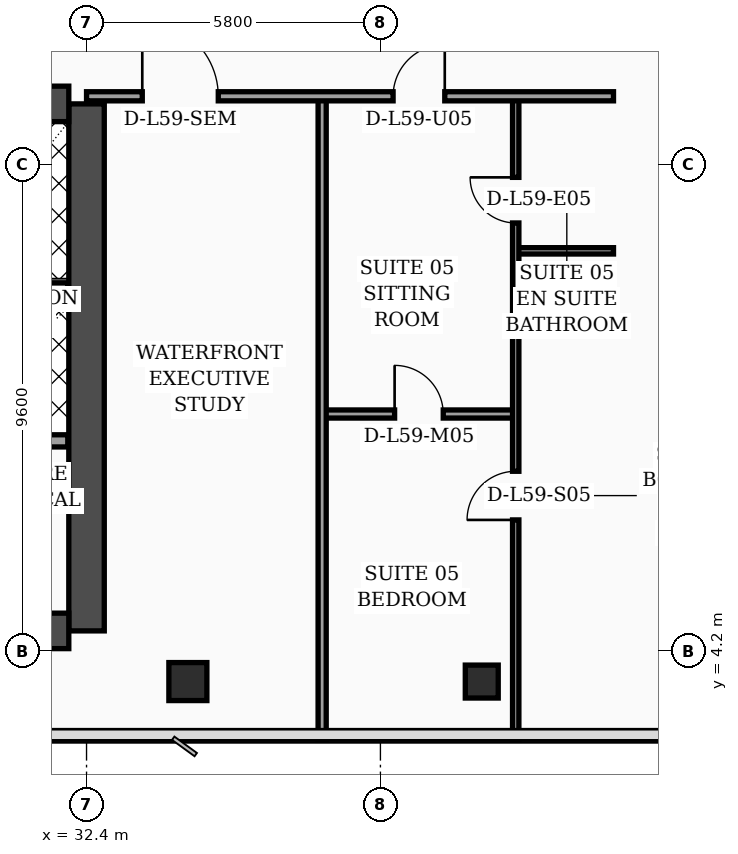
"""IFC4 building model, lengths in metres.
Left out: names, types, materials, properties, quantities, classifications, styles, units other than length and angle.
Written with IfcOpenShell. Run it as: python <this file> out.ifc"""

import sys

from ifc_helpers import new_model, si_unit, direction, frame, frame_2d, origin, origin_2d, place, context, subcontext, project, spatial, rectangle, hollow_rectangle, extrude, element, fill, save


model = new_model("IFC4")
c1 = context("Model", 3, precision=1e-05, world=origin(), true_north=direction((0.0, 1.0)))
c2 = subcontext(c1, "Body", "Model", "MODEL_VIEW")
j1 = project(units=[si_unit("LENGTHUNIT", "METRE"), si_unit("PLANEANGLEUNIT", "RADIAN")], contexts=[c1])
p1 = place(None, origin())
s1 = spatial("IfcSite", under=j1, at=p1, CompositionType="ELEMENT")
p2 = place(p1, origin())
s2 = spatial("IfcBuilding", under=s1, at=p2, CompositionType="ELEMENT")
p3 = place(p2, frame((0.0, 0.0, 239.3)))
s3 = spatial("IfcBuildingStorey", under=s2, at=p3, CompositionType="ELEMENT", Elevation=239.3)
p4 = place(p3, frame((32.4, 4.6, 0.0), z_axis=(0.0, 0.0, 1.0), x_axis=(0.0, 1.0, 0.0)))
e1 = element("IfcWall", 1, at=p4, inside=s3, PredefinedType="SHEAR", context=c2, shape_type="SweptSolid", body=[
    extrude(rectangle(XDim=10.4, YDim=0.7, at=frame_2d((5.2, 0.0))), origin(), (0.0, 0.0, 1.0), 4.05),
])
p5 = place(p3, frame((21.95, 15.0, 0.0), z_axis=(0.0, 0.0, 1.0), x_axis=(1.0, 0.0, 0.0)))
e2 = element("IfcWall", 2, at=p5, inside=s3, PredefinedType="SHEAR", context=c2, shape_type="SweptSolid", body=[
    extrude(rectangle(XDim=10.1, YDim=0.7, at=frame_2d((5.05, 0.0))), origin(), (0.0, 0.0, 1.0), 4.05),
])
p6 = place(p5, frame((4.95, 0.0, 0.0)))
e3 = element("IfcOpeningElement", 3, at=p6, cuts=e2, PredefinedType="OPENING", context=c2, shape_type="SweptSolid", body=[
    extrude(rectangle(XDim=1.1, YDim=2.2, at=frame_2d((0.55, 1.1))), frame((0.0, 0.36, 0.0), z_axis=(0.0, -1.0, 0.0), x_axis=(1.0, 0.0, 0.0)), (0.0, 0.0, 1.0), 0.72),
])
p7 = place(p3, frame((21.95, 4.6, 0.0), z_axis=(0.0, 0.0, 1.0), x_axis=(1.0, 0.0, 0.0)))
e4 = element("IfcWall", 4, at=p7, inside=s3, PredefinedType="SHEAR", context=c2, shape_type="SweptSolid", body=[
    extrude(rectangle(XDim=10.1, YDim=0.7, at=frame_2d((5.05, 0.0))), origin(), (0.0, 0.0, 1.0), 4.05),
])
p8 = place(p3, frame((34.4, 3.6, 0.0), z_axis=(0.0, 0.0, 1.0), x_axis=(1.0, 0.0, 0.0)))
e5 = element("IfcColumn", 5, at=p8, inside=s3, PredefinedType="COLUMN", context=c2, shape_type="SweptSolid", body=[
    extrude(hollow_rectangle(XDim=0.75, YDim=0.75, WallThickness=0.032, at=origin_2d()), origin(), (0.0, 0.0, 1.0), 4.05),
])
p9 = place(p3, frame((40.2, 3.6, 0.0), z_axis=(0.0, 0.0, 1.0), x_axis=(1.0, 0.0, 0.0)))
e6 = element("IfcColumn", 6, at=p9, inside=s3, PredefinedType="COLUMN", context=c2, shape_type="SweptSolid", body=[
    extrude(hollow_rectangle(XDim=0.65, YDim=0.65, WallThickness=0.028, at=origin_2d()), origin(), (0.0, 0.0, 1.0), 4.05),
])
p10 = place(p3, frame((49.43, 5.505, 0.0), z_axis=(0.0, 0.0, 1.0), x_axis=(-0.300509063924, 0.953778958931, 0.0)))
e7 = element("IfcWall", 7, at=p10, inside=s3, PredefinedType="SOLIDWALL", context=c2, shape_type="SweptSolid", body=[
    extrude(rectangle(XDim=30.814, YDim=0.32, at=frame_2d((15.407, 0.0))), origin(), (0.0, 0.0, 1.0), 4.05),
])
p11 = place(p10, frame((4.747, 0.0, 0.0)))
e8 = element("IfcOpeningElement", 8, at=p11, cuts=e7, PredefinedType="OPENING", context=c2, shape_type="SweptSolid", body=[
    extrude(rectangle(XDim=1.4, YDim=2.25, at=frame_2d((0.7, 1.125))), frame((0.0, 0.17, 0.0), z_axis=(0.0, -1.0, 0.0), x_axis=(1.0, 0.0, 0.0)), (0.0, 0.0, 1.0), 0.34),
])
p12 = place(p10, frame((9.889, 0.0, 0.7)))
e9 = element("IfcOpeningElement", 9, at=p12, cuts=e7, PredefinedType="OPENING", context=c2, shape_type="SweptSolid", body=[
    extrude(rectangle(XDim=1.6, YDim=1.65, at=frame_2d((0.8, 0.825))), frame((0.0, 0.17, 0.0), z_axis=(0.0, -1.0, 0.0), x_axis=(1.0, 0.0, 0.0)), (0.0, 0.0, 1.0), 0.34),
])
p13 = place(p10, frame((18.696, 0.0, 0.7)))
e10 = element("IfcOpeningElement", 10, at=p13, cuts=e7, PredefinedType="OPENING", context=c2, shape_type="SweptSolid", body=[
    extrude(rectangle(XDim=1.6, YDim=1.65, at=frame_2d((0.8, 0.825))), frame((0.0, 0.17, 0.0), z_axis=(0.0, -1.0, 0.0), x_axis=(1.0, 0.0, 0.0)), (0.0, 0.0, 1.0), 0.34),
])
p14 = place(p10, frame((1.6, 0.0, 0.75)))
e11 = element("IfcOpeningElement", 11, at=p14, cuts=e7, PredefinedType="OPENING", context=c2, shape_type="SweptSolid", body=[
    extrude(rectangle(XDim=1.5, YDim=1.6, at=frame_2d((0.75, 0.8))), frame((0.0, 0.17, 0.0), z_axis=(0.0, -1.0, 0.0), x_axis=(1.0, 0.0, 0.0)), (0.0, 0.0, 1.0), 0.34),
])
p15 = place(p10, frame((7.8, 0.0, 0.75)))
e12 = element("IfcOpeningElement", 12, at=p15, cuts=e7, PredefinedType="OPENING", context=c2, shape_type="SweptSolid", body=[
    extrude(rectangle(XDim=1.5, YDim=1.6, at=frame_2d((0.75, 0.8))), frame((0.0, 0.17, 0.0), z_axis=(0.0, -1.0, 0.0), x_axis=(1.0, 0.0, 0.0)), (0.0, 0.0, 1.0), 0.34),
])
p16 = place(p10, frame((11.95, 0.0, 0.75)))
e13 = element("IfcOpeningElement", 13, at=p16, cuts=e7, PredefinedType="OPENING", context=c2, shape_type="SweptSolid", body=[
    extrude(rectangle(XDim=1.5, YDim=1.6, at=frame_2d((0.75, 0.8))), frame((0.0, 0.17, 0.0), z_axis=(0.0, -1.0, 0.0), x_axis=(1.0, 0.0, 0.0)), (0.0, 0.0, 1.0), 0.34),
])
p17 = place(p10, frame((14.0, 0.0, 0.75)))
e14 = element("IfcOpeningElement", 14, at=p17, cuts=e7, PredefinedType="OPENING", context=c2, shape_type="SweptSolid", body=[
    extrude(rectangle(XDim=1.5, YDim=1.6, at=frame_2d((0.75, 0.8))), frame((0.0, 0.17, 0.0), z_axis=(0.0, -1.0, 0.0), x_axis=(1.0, 0.0, 0.0)), (0.0, 0.0, 1.0), 0.34),
])
p18 = place(p10, frame((16.55, 0.0, 0.75)))
e15 = element("IfcOpeningElement", 15, at=p18, cuts=e7, PredefinedType="OPENING", context=c2, shape_type="SweptSolid", body=[
    extrude(rectangle(XDim=1.5, YDim=1.6, at=frame_2d((0.75, 0.8))), frame((0.0, 0.17, 0.0), z_axis=(0.0, -1.0, 0.0), x_axis=(1.0, 0.0, 0.0)), (0.0, 0.0, 1.0), 0.34),
])
p19 = place(p10, frame((20.75, 0.0, 0.75)))
e16 = element("IfcOpeningElement", 16, at=p19, cuts=e7, PredefinedType="OPENING", context=c2, shape_type="SweptSolid", body=[
    extrude(rectangle(XDim=1.5, YDim=1.6, at=frame_2d((0.75, 0.8))), frame((0.0, 0.17, 0.0), z_axis=(0.0, -1.0, 0.0), x_axis=(1.0, 0.0, 0.0)), (0.0, 0.0, 1.0), 0.34),
])
p20 = place(p10, frame((23.3, 0.0, 0.75)))
e17 = element("IfcOpeningElement", 17, at=p20, cuts=e7, PredefinedType="OPENING", context=c2, shape_type="SweptSolid", body=[
    extrude(rectangle(XDim=1.5, YDim=1.6, at=frame_2d((0.75, 0.8))), frame((0.0, 0.17, 0.0), z_axis=(0.0, -1.0, 0.0), x_axis=(1.0, 0.0, 0.0)), (0.0, 0.0, 1.0), 0.34),
])
p21 = place(p10, frame((26.4, 0.0, 0.75)))
e18 = element("IfcOpeningElement", 18, at=p21, cuts=e7, PredefinedType="OPENING", context=c2, shape_type="SweptSolid", body=[
    extrude(rectangle(XDim=1.5, YDim=1.6, at=frame_2d((0.75, 0.8))), frame((0.0, 0.17, 0.0), z_axis=(0.0, -1.0, 0.0), x_axis=(1.0, 0.0, 0.0)), (0.0, 0.0, 1.0), 0.34),
])
p22 = place(p3, frame((27.02, 11.35, 0.0), z_axis=(0.0, 0.0, 1.0), x_axis=(1.0, 0.0, 0.0)))
e19 = element("IfcWall", 19, at=p22, inside=s3, PredefinedType="SOLIDWALL", context=c2, shape_type="SweptSolid", body=[
    extrude(rectangle(XDim=5.01, YDim=0.24, at=frame_2d((2.505, 0.0))), origin(), (0.0, 0.0, 1.0), 4.05),
])
p23 = place(p22, frame((0.45, 0.0, 0.0)))
e20 = element("IfcOpeningElement", 20, at=p23, cuts=e19, PredefinedType="OPENING", context=c2, shape_type="SweptSolid", body=[
    extrude(rectangle(XDim=1.3, YDim=2.35, at=frame_2d((0.65, 1.175))), frame((0.0, 0.13, 0.0), z_axis=(0.0, -1.0, 0.0), x_axis=(1.0, 0.0, 0.0)), (0.0, 0.0, 1.0), 0.26),
])
p24 = place(p3, frame((27.02, 8.35, 0.0), z_axis=(0.0, 0.0, 1.0), x_axis=(1.0, 0.0, 0.0)))
e21 = element("IfcWall", 21, at=p24, inside=s3, PredefinedType="SOLIDWALL", context=c2, shape_type="SweptSolid", body=[
    extrude(rectangle(XDim=5.01, YDim=0.24, at=frame_2d((2.505, 0.0))), origin(), (0.0, 0.0, 1.0), 4.05),
])
p25 = place(p3, frame((40.87, 12.1, 0.0), z_axis=(0.0, 0.0, 1.0), x_axis=(1.0, 0.0, 0.0)))
e22 = element("IfcWall", 22, at=p25, inside=s3, PredefinedType="PARTITIONING", context=c2, shape_type="SweptSolid", body=[
    extrude(rectangle(XDim=1.93, YDim=0.125, at=frame_2d((0.965, 0.0))), origin(), (0.0, 0.0, 1.0), 4.05),
])
p26 = place(p3, frame((37.05, 8.88, 0.0), z_axis=(0.0, 0.0, 1.0), x_axis=(1.0, 0.0, 0.0)))
e23 = element("IfcWall", 23, at=p26, inside=s3, PredefinedType="PARTITIONING", context=c2, shape_type="SweptSolid", body=[
    extrude(rectangle(XDim=3.82, YDim=0.16, at=frame_2d((1.91, 0.0))), origin(), (0.0, 0.0, 1.0), 3.5),
])
p27 = place(p26, frame((1.43, 0.0, 0.0)))
e24 = element("IfcOpeningElement", 24, at=p27, cuts=e23, PredefinedType="OPENING", context=c2, shape_type="SweptSolid", body=[
    extrude(rectangle(XDim=0.96, YDim=2.2, at=frame_2d((0.48, 1.1))), frame((0.0, 0.09, 0.0), z_axis=(0.0, -1.0, 0.0), x_axis=(1.0, 0.0, 0.0)), (0.0, 0.0, 1.0), 0.18),
])
p28 = place(p3, frame((40.87, 2.44, 0.0), z_axis=(0.0, 0.0, 1.0), x_axis=(0.0, 1.0, 0.0)))
e25 = element("IfcWall", 25, at=p28, inside=s3, PredefinedType="PARTITIONING", context=c2, shape_type="SweptSolid", body=[
    extrude(rectangle(XDim=12.71, YDim=0.125, at=frame_2d((6.355, 0.0))), origin(), (0.0, 0.0, 1.0), 2.35),
])
p29 = place(p28, frame((4.35, 0.0, 0.0)))
e26 = element("IfcOpeningElement", 26, at=p29, cuts=e25, PredefinedType="OPENING", context=c2, shape_type="SweptSolid", body=[
    extrude(rectangle(XDim=0.96, YDim=2.2, at=frame_2d((0.48, 1.1))), frame((0.0, 0.073, 0.0), z_axis=(0.0, -1.0, 0.0), x_axis=(1.0, 0.0, 0.0)), (0.0, 0.0, 1.0), 0.145),
])
p30 = place(p28, frame((10.21, 0.0, 0.0)))
e27 = element("IfcOpeningElement", 27, at=p30, cuts=e25, PredefinedType="OPENING", context=c2, shape_type="SweptSolid", body=[
    extrude(rectangle(XDim=0.9, YDim=2.15, at=frame_2d((0.45, 1.075))), frame((0.0, 0.073, 0.0), z_axis=(0.0, -1.0, 0.0), x_axis=(1.0, 0.0, 0.0)), (0.0, 0.0, 1.0), 0.145),
])
p31 = place(p3, frame((37.05, 2.44, 0.0), z_axis=(0.0, 0.0, 1.0), x_axis=(0.0, 1.0, 0.0)))
e28 = element("IfcWall", 28, at=p31, inside=s3, PredefinedType="PARTITIONING", context=c2, shape_type="SweptSolid", body=[
    extrude(rectangle(XDim=12.71, YDim=0.16, at=frame_2d((6.355, 0.0))), origin(), (0.0, 0.0, 1.0), 2.35),
])
p32 = place(p3, frame((32.4, 15.15, 0.0), z_axis=(0.0, 0.0, 1.0), x_axis=(1.0, 0.0, 0.0)))
e29 = element("IfcWall", 29, at=p32, inside=s3, PredefinedType="PARTITIONING", context=c2, shape_type="SweptSolid", body=[
    extrude(rectangle(XDim=10.4, YDim=0.18, at=frame_2d((5.2, 0.0))), origin(), (0.0, 0.0, 1.0), 2.35),
])
p33 = place(p32, frame((1.1, 0.0, 0.0)))
e30 = element("IfcOpeningElement", 30, at=p33, cuts=e29, PredefinedType="OPENING", context=c2, shape_type="SweptSolid", body=[
    extrude(rectangle(XDim=1.5, YDim=2.22, at=frame_2d((0.75, 1.11))), frame((0.0, 0.1, 0.0), z_axis=(0.0, -1.0, 0.0), x_axis=(1.0, 0.0, 0.0)), (0.0, 0.0, 1.0), 0.2),
])
p34 = place(p32, frame((6.05, 0.0, 0.0)))
e31 = element("IfcOpeningElement", 31, at=p34, cuts=e29, PredefinedType="OPENING", context=c2, shape_type="SweptSolid", body=[
    extrude(rectangle(XDim=1.02, YDim=2.2, at=frame_2d((0.51, 1.1))), frame((0.0, 0.1, 0.0), z_axis=(0.0, -1.0, 0.0), x_axis=(1.0, 0.0, 0.0)), (0.0, 0.0, 1.0), 0.2),
])
p35 = place(p27, origin())
e32 = element("IfcDoor", 32, at=p35, inside=s3, OperationType="SINGLE_SWING_LEFT", PredefinedType="DOOR", context=c2, shape_type="SweptSolid", body=[
    extrude(rectangle(XDim=0.96, YDim=2.2, at=frame_2d((0.48, 1.1))), frame((0.0, 0.025, 0.0), z_axis=(0.0, -1.0, 0.0), x_axis=(1.0, 0.0, 0.0)), (0.0, 0.0, 1.0), 0.05),
])
fill(e24, e32)
p36 = place(p29, origin())
e33 = element("IfcDoor", 33, at=p36, inside=s3, OperationType="SINGLE_SWING_LEFT", PredefinedType="DOOR", context=c2, shape_type="SweptSolid", body=[
    extrude(rectangle(XDim=0.96, YDim=2.2, at=frame_2d((0.48, 1.1))), frame((0.0, 0.025, 0.0), z_axis=(0.0, -1.0, 0.0), x_axis=(1.0, 0.0, 0.0)), (0.0, 0.0, 1.0), 0.05),
])
fill(e26, e33)
p37 = place(p30, origin())
e34 = element("IfcDoor", 34, at=p37, inside=s3, OperationType="SINGLE_SWING_RIGHT", PredefinedType="DOOR", context=c2, shape_type="SweptSolid", body=[
    extrude(rectangle(XDim=0.9, YDim=2.15, at=frame_2d((0.45, 1.075))), frame((0.0, 0.025, 0.0), z_axis=(0.0, -1.0, 0.0), x_axis=(1.0, 0.0, 0.0)), (0.0, 0.0, 1.0), 0.05),
])
fill(e27, e34)
p38 = place(p33, origin())
e35 = element("IfcDoor", 35, at=p38, inside=s3, OperationType="SINGLE_SWING_LEFT", PredefinedType="DOOR", context=c2, shape_type="SweptSolid", body=[
    extrude(rectangle(XDim=1.5, YDim=2.22, at=frame_2d((0.75, 1.11))), frame((0.0, 0.025, 0.0), z_axis=(0.0, -1.0, 0.0), x_axis=(1.0, 0.0, 0.0)), (0.0, 0.0, 1.0), 0.05),
])
fill(e30, e35)
p39 = place(p34, origin())
e36 = element("IfcDoor", 36, at=p39, inside=s3, OperationType="SINGLE_SWING_RIGHT", PredefinedType="DOOR", context=c2, shape_type="SweptSolid", body=[
    extrude(rectangle(XDim=1.02, YDim=2.2, at=frame_2d((0.51, 1.1))), frame((0.0, 0.025, 0.0), z_axis=(0.0, -1.0, 0.0), x_axis=(1.0, 0.0, 0.0)), (0.0, 0.0, 1.0), 0.05),
])
fill(e31, e36)
save(model, sys.argv[1])
